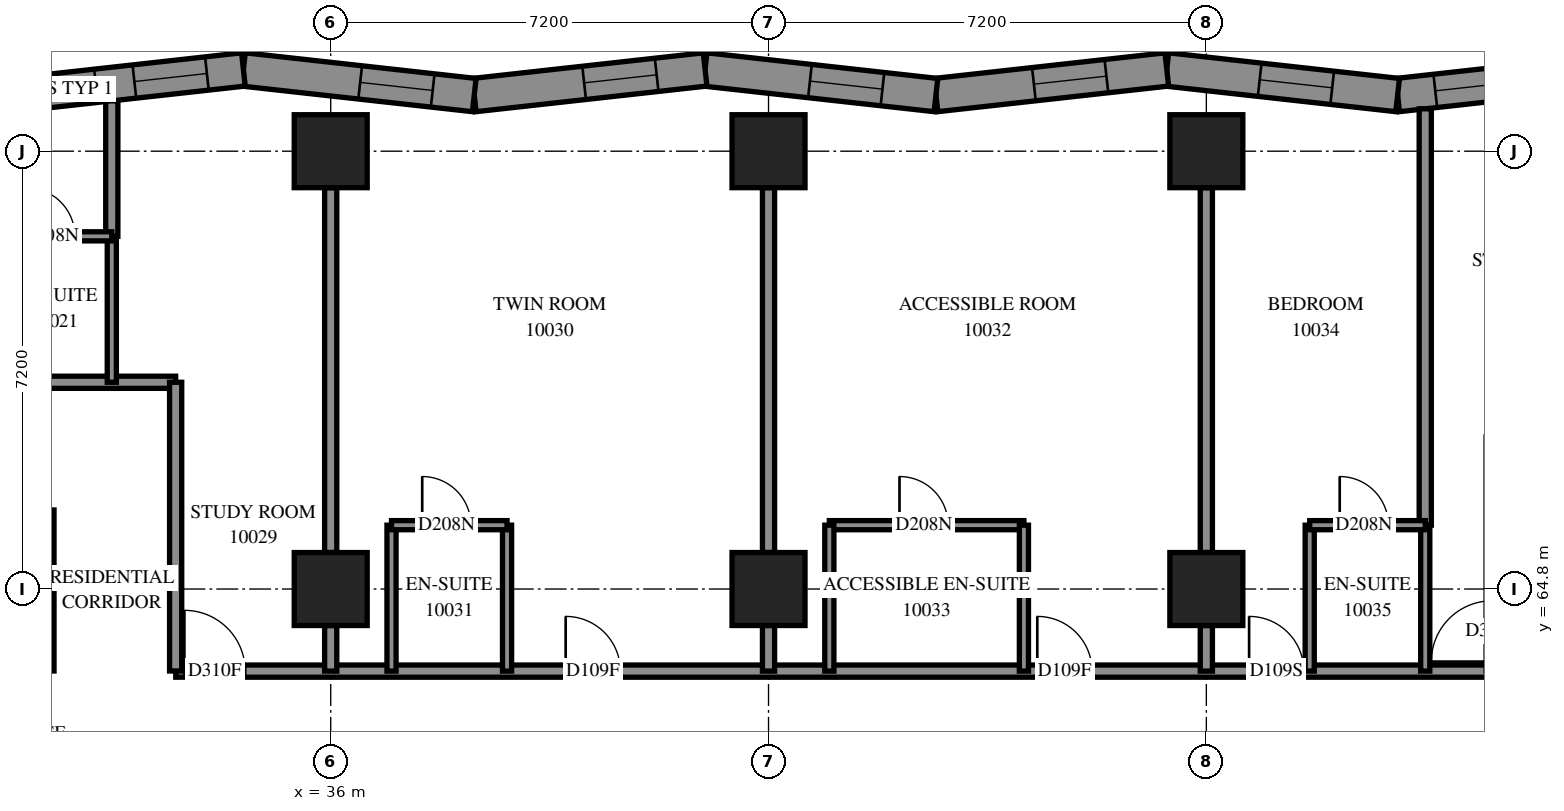
"""IFC4 building model, lengths in metres.
Left out: names, types, materials, properties, quantities, classifications, styles, units other than length and angle.
Written with IfcOpenShell. Run it as: python <this file> out.ifc"""

import sys

from ifc_helpers import new_model, si_unit, direction, frame, frame_2d, origin, origin_2d, place, context, subcontext, project, spatial, polyline, rectangle, outline, extrude, element, fill, save


model = new_model("IFC4")
c1 = context("Model", 3, precision=1e-05, world=origin(), true_north=direction((0.0, 1.0)))
c2 = subcontext(c1, "Body", "Model", "MODEL_VIEW")
j1 = project(units=[si_unit("LENGTHUNIT", "METRE"), si_unit("PLANEANGLEUNIT", "RADIAN")], contexts=[c1])
p1 = place(None, origin())
s1 = spatial("IfcSite", under=j1, at=p1, CompositionType="ELEMENT")
p2 = place(p1, origin())
s2 = spatial("IfcBuilding", under=s1, at=p2, CompositionType="ELEMENT")
p3 = place(p2, frame((0.0, 0.0, 40.6)))
s3 = spatial("IfcBuildingStorey", under=s2, at=p3, CompositionType="ELEMENT", Elevation=40.6)
for number, where, z_axis, x_axis in (
    (1, (36.0, 64.8, 0.0), (0.0, 0.0, 1.0), (1.0, 0.0, 0.0)),
    (2, (36.0, 72.0, 0.0), (0.0, 0.0, 1.0), (1.0, 0.0, 0.0)),
    (3, (43.2, 64.8, 0.0), (0.0, 0.0, 1.0), (1.0, 0.0, 0.0)),
    (4, (43.2, 72.0, 0.0), (0.0, 0.0, 1.0), (1.0, 0.0, 0.0)),
    (5, (50.4, 64.8, 0.0), (0.0, 0.0, 1.0), (1.0, 0.0, 0.0)),
    (6, (50.4, 72.0, 0.0), (0.0, 0.0, 1.0), (1.0, 0.0, 0.0)),
):
    element("IfcColumn", number, at=place(p3, frame(where, z_axis=z_axis, x_axis=x_axis)), inside=s3, PredefinedType="COLUMN", context=c2, shape_type="SweptSolid", body=[
        extrude(rectangle(XDim=1.2, YDim=1.2, at=origin_2d()), origin(), (0.0, 0.0, 1.0), 3.1),
    ])
p4 = place(p3, frame((57.342, 73.344, 0.0), z_axis=(0.0, 0.0, 1.0), x_axis=(-0.99390702, -0.1102217568, 0.0)))
e7 = element("IfcWall", 7, at=p4, inside=s3, PredefinedType="SOLIDWALL", context=c2, shape_type="SweptSolid", body=[
    extrude(outline(polyline([(-0.03, -0.275), (3.789, -0.275), (3.85, 0.275), (0.03, 0.275), (-0.03, -0.275)])), origin(), (0.0, 0.0, 1.0), 3.1),
])
p5 = place(p4, frame((0.397, 0.0, 0.5)))
e8 = element("IfcOpeningElement", 8, at=p5, cuts=e7, PredefinedType="OPENING", context=c2, shape_type="SweptSolid", body=[
    extrude(rectangle(XDim=2.8, YDim=2.45, at=frame_2d((1.4, 1.225))), frame((0.0, 0.285, 0.0), z_axis=(0.0, -1.0, 0.0), x_axis=(1.0, 0.0, 0.0)), (0.0, 0.0, 1.0), 0.57),
])
p6 = place(p3, frame((53.546, 72.923, 0.0), z_axis=(0.0, 0.0, 1.0), x_axis=(-0.99390702, 0.1102217568, 0.0)))
e9 = element("IfcWall", 9, at=p6, inside=s3, PredefinedType="SOLIDWALL", context=c2, shape_type="SweptSolid", body=[
    extrude(outline(polyline([(0.03, -0.275), (3.85, -0.275), (3.789, 0.275), (-0.03, 0.275), (0.03, -0.275)])), origin(), (0.0, 0.0, 1.0), 3.1),
])
p7 = place(p6, frame((1.083, 0.0, 0.5)))
e10 = element("IfcOpeningElement", 10, at=p7, cuts=e9, PredefinedType="OPENING", context=c2, shape_type="SweptSolid", body=[
    extrude(rectangle(XDim=1.2, YDim=2.45, at=frame_2d((0.6, 1.225))), frame((0.0, 0.285, 0.0), z_axis=(0.0, -1.0, 0.0), x_axis=(1.0, 0.0, 0.0)), (0.0, 0.0, 1.0), 0.57),
])
p8 = place(p3, frame((49.749, 73.344, 0.0), z_axis=(0.0, 0.0, 1.0), x_axis=(-0.99390702, -0.1102217568, 0.0)))
e11 = element("IfcWall", 11, at=p8, inside=s3, PredefinedType="SOLIDWALL", context=c2, shape_type="SweptSolid", body=[
    extrude(outline(polyline([(-0.03, -0.275), (3.789, -0.275), (3.85, 0.275), (0.03, 0.275), (-0.03, -0.275)])), origin(), (0.0, 0.0, 1.0), 3.1),
])
p9 = place(p8, frame((0.999, 0.0, 0.5)))
e12 = element("IfcOpeningElement", 12, at=p9, cuts=e11, PredefinedType="OPENING", context=c2, shape_type="SweptSolid", body=[
    extrude(rectangle(XDim=1.2, YDim=2.45, at=frame_2d((0.6, 1.225))), frame((0.0, 0.285, 0.0), z_axis=(0.0, -1.0, 0.0), x_axis=(1.0, 0.0, 0.0)), (0.0, 0.0, 1.0), 0.57),
])
p10 = place(p3, frame((45.953, 72.923, 0.0), z_axis=(0.0, 0.0, 1.0), x_axis=(-0.99390702, 0.1102217568, 0.0)))
e13 = element("IfcWall", 13, at=p10, inside=s3, PredefinedType="SOLIDWALL", context=c2, shape_type="SweptSolid", body=[
    extrude(outline(polyline([(0.03, -0.275), (3.85, -0.275), (3.789, 0.275), (-0.03, 0.275), (0.03, -0.275)])), origin(), (0.0, 0.0, 1.0), 3.1),
])
p11 = place(p10, frame((0.885, 0.0, 0.5)))
e14 = element("IfcOpeningElement", 14, at=p11, cuts=e13, PredefinedType="OPENING", context=c2, shape_type="SweptSolid", body=[
    extrude(rectangle(XDim=1.2, YDim=2.45, at=frame_2d((0.6, 1.225))), frame((0.0, 0.285, 0.0), z_axis=(0.0, -1.0, 0.0), x_axis=(1.0, 0.0, 0.0)), (0.0, 0.0, 1.0), 0.57),
])
p12 = place(p3, frame((42.157, 73.344, 0.0), z_axis=(0.0, 0.0, 1.0), x_axis=(-0.99390702, -0.1102217568, 0.0)))
e15 = element("IfcWall", 15, at=p12, inside=s3, PredefinedType="SOLIDWALL", context=c2, shape_type="SweptSolid", body=[
    extrude(outline(polyline([(-0.03, -0.275), (3.789, -0.275), (3.85, 0.275), (0.03, 0.275), (-0.03, -0.275)])), origin(), (0.0, 0.0, 1.0), 3.1),
])
p13 = place(p12, frame((0.801, 0.0, 0.5)))
e16 = element("IfcOpeningElement", 16, at=p13, cuts=e15, PredefinedType="OPENING", context=c2, shape_type="SweptSolid", body=[
    extrude(rectangle(XDim=1.2, YDim=2.45, at=frame_2d((0.6, 1.225))), frame((0.0, 0.285, 0.0), z_axis=(0.0, -1.0, 0.0), x_axis=(1.0, 0.0, 0.0)), (0.0, 0.0, 1.0), 0.57),
])
p14 = place(p3, frame((38.361, 72.923, 0.0), z_axis=(0.0, 0.0, 1.0), x_axis=(-0.99390702, 0.1102217568, 0.0)))
e17 = element("IfcWall", 17, at=p14, inside=s3, PredefinedType="SOLIDWALL", context=c2, shape_type="SweptSolid", body=[
    extrude(outline(polyline([(0.03, -0.275), (3.85, -0.275), (3.789, 0.275), (-0.03, 0.275), (0.03, -0.275)])), origin(), (0.0, 0.0, 1.0), 3.1),
])
p15 = place(p14, frame((0.688, 0.0, 0.5)))
e18 = element("IfcOpeningElement", 18, at=p15, cuts=e17, PredefinedType="OPENING", context=c2, shape_type="SweptSolid", body=[
    extrude(rectangle(XDim=1.2, YDim=2.45, at=frame_2d((0.6, 1.225))), frame((0.0, 0.285, 0.0), z_axis=(0.0, -1.0, 0.0), x_axis=(1.0, 0.0, 0.0)), (0.0, 0.0, 1.0), 0.57),
])
p16 = place(p3, frame((34.564, 73.344, 0.0), z_axis=(0.0, 0.0, 1.0), x_axis=(-0.993907338, -0.1102188888, 0.0)))
e19 = element("IfcWall", 19, at=p16, inside=s3, PredefinedType="SOLIDWALL", context=c2, shape_type="SweptSolid", body=[
    extrude(outline(polyline([(-0.03, -0.275), (3.789, -0.275), (3.85, 0.275), (0.03, 0.275), (-0.03, -0.275)])), origin(), (0.0, 0.0, 1.0), 3.1),
])
p17 = place(p16, frame((0.604, 0.0, 0.5)))
e20 = element("IfcOpeningElement", 20, at=p17, cuts=e19, PredefinedType="OPENING", context=c2, shape_type="SweptSolid", body=[
    extrude(rectangle(XDim=1.2, YDim=2.45, at=frame_2d((0.6, 1.225))), frame((0.0, 0.285, 0.0), z_axis=(0.0, -1.0, 0.0), x_axis=(1.0, 0.0, 0.0)), (0.0, 0.0, 1.0), 0.57),
])
p18 = place(p16, frame((2.439, 0.0, 0.45)))
e21 = element("IfcOpeningElement", 21, at=p18, cuts=e19, PredefinedType="OPENING", context=c2, shape_type="SweptSolid", body=[
    extrude(rectangle(XDim=1.0, YDim=2.5, at=frame_2d((0.5, 1.25))), frame((0.0, 0.285, 0.0), z_axis=(0.0, -1.0, 0.0), x_axis=(1.0, 0.0, 0.0)), (0.0, 0.0, 1.0), 0.57),
])
p19 = place(p3, frame((33.452, 63.45, 0.0), z_axis=(0.0, 0.0, 1.0), x_axis=(1.0, 0.0, 0.0)))
e22 = element("IfcWall", 22, at=p19, inside=s3, PredefinedType="PARTITIONING", context=c2, shape_type="SweptSolid", body=[
    extrude(rectangle(XDim=21.648, YDim=0.2, at=frame_2d((10.824, 0.0))), origin(), (0.0, 0.0, 1.0), 3.1),
])
p20 = place(p19, frame((0.142, 0.0, 0.0)))
e23 = element("IfcOpeningElement", 23, at=p20, cuts=e22, PredefinedType="OPENING", context=c2, shape_type="SweptSolid", body=[
    extrude(rectangle(XDim=1.0, YDim=2.1, at=frame_2d((0.5, 1.05))), frame((0.0, 0.11, 0.0), z_axis=(0.0, -1.0, 0.0), x_axis=(1.0, 0.0, 0.0)), (0.0, 0.0, 1.0), 0.22),
])
p21 = place(p19, frame((6.412, 0.0, 0.0)))
e24 = element("IfcOpeningElement", 24, at=p21, cuts=e22, PredefinedType="OPENING", context=c2, shape_type="SweptSolid", body=[
    extrude(rectangle(XDim=0.9, YDim=2.1, at=frame_2d((0.45, 1.05))), frame((0.0, 0.11, 0.0), z_axis=(0.0, -1.0, 0.0), x_axis=(1.0, 0.0, 0.0)), (0.0, 0.0, 1.0), 0.22),
])
p22 = place(p19, frame((14.168, 0.0, 0.0)))
e25 = element("IfcOpeningElement", 25, at=p22, cuts=e22, PredefinedType="OPENING", context=c2, shape_type="SweptSolid", body=[
    extrude(rectangle(XDim=0.9, YDim=2.1, at=frame_2d((0.45, 1.05))), frame((0.0, 0.11, 0.0), z_axis=(0.0, -1.0, 0.0), x_axis=(1.0, 0.0, 0.0)), (0.0, 0.0, 1.0), 0.22),
])
p23 = place(p19, frame((17.651, 0.0, 0.0)))
e26 = element("IfcOpeningElement", 26, at=p23, cuts=e22, PredefinedType="OPENING", context=c2, shape_type="SweptSolid", body=[
    extrude(rectangle(XDim=0.9, YDim=2.1, at=frame_2d((0.45, 1.05))), frame((0.0, 0.11, 0.0), z_axis=(0.0, -1.0, 0.0), x_axis=(1.0, 0.0, 0.0)), (0.0, 0.0, 1.0), 0.22),
])
p24 = place(p3, frame((21.602, 68.2, 0.0), z_axis=(0.0, 0.0, 1.0), x_axis=(1.0, 0.0, 0.0)))
e27 = element("IfcWall", 27, at=p24, inside=s3, PredefinedType="PARTITIONING", context=c2, shape_type="SweptSolid", body=[
    extrude(rectangle(XDim=11.848, YDim=0.2, at=frame_2d((5.924, 0.0))), origin(), (0.0, 0.0, 1.0), 3.1),
])
p25 = place(p24, frame((5.855, 0.0, 0.0)))
e28 = element("IfcOpeningElement", 28, at=p25, cuts=e27, PredefinedType="OPENING", context=c2, shape_type="SweptSolid", body=[
    extrude(rectangle(XDim=0.9, YDim=2.1, at=frame_2d((0.45, 1.05))), frame((0.0, 0.11, 0.0), z_axis=(0.0, -1.0, 0.0), x_axis=(1.0, 0.0, 0.0)), (0.0, 0.0, 1.0), 0.22),
])
p26 = place(p3, frame((54.0, 65.85, 0.0), z_axis=(0.0, 0.0, 1.0), x_axis=(0.0, 1.0, 0.0)))
e29 = element("IfcWall", 29, at=p26, inside=s3, PredefinedType="PARTITIONING", context=c2, shape_type="SweptSolid", body=[
    extrude(rectangle(XDim=6.847, YDim=0.2, at=frame_2d((3.424, 0.0))), origin(), (0.0, 0.0, 1.0), 3.1),
])
for number, where, z_axis, x_axis in (
    (30, (36.0, 65.4, 0.0), (0.0, 0.0, 1.0), (0.0, 1.0, 0.0)),
    (31, (43.2, 65.4, 0.0), (0.0, 0.0, 1.0), (0.0, 1.0, 0.0)),
    (32, (50.4, 65.4, 0.0), (0.0, 0.0, 1.0), (0.0, 1.0, 0.0)),
):
    element("IfcWall", number, at=place(p3, frame(where, z_axis=z_axis, x_axis=x_axis)), inside=s3, PredefinedType="PARTITIONING", context=c2, shape_type="SweptSolid", body=[
        extrude(rectangle(XDim=6.0, YDim=0.2, at=frame_2d((3.0, 0.0))), origin(), (0.0, 0.0, 1.0), 3.1),
    ])
p27 = place(p3, frame((33.45, 63.452, 0.0), z_axis=(0.0, 0.0, 1.0), x_axis=(0.0, 1.0, 0.0)))
e33 = element("IfcWall", 33, at=p27, inside=s3, PredefinedType="PARTITIONING", context=c2, shape_type="SweptSolid", body=[
    extrude(rectangle(XDim=4.748, YDim=0.2, at=frame_2d((2.374, 0.0))), origin(), (0.0, 0.0, 1.0), 3.1),
])
p28 = place(p3, frame((44.2, 65.85, 0.0), z_axis=(0.0, 0.0, 1.0), x_axis=(1.0, 0.0, 0.0)))
e34 = element("IfcWall", 34, at=p28, inside=s3, PredefinedType="PARTITIONING", context=c2, shape_type="SweptSolid", body=[
    extrude(rectangle(XDim=3.2, YDim=0.15, at=frame_2d((1.6, 0.0))), origin(), (0.0, 0.0, 1.0), 3.1),
])
p29 = place(p28, frame((1.154, 0.0, 0.0)))
e35 = element("IfcOpeningElement", 35, at=p29, cuts=e34, PredefinedType="OPENING", context=c2, shape_type="SweptSolid", body=[
    extrude(rectangle(XDim=0.8, YDim=2.1, at=frame_2d((0.4, 1.05))), frame((0.0, 0.085, 0.0), z_axis=(0.0, -1.0, 0.0), x_axis=(1.0, 0.0, 0.0)), (0.0, 0.0, 1.0), 0.17),
])
p30 = place(p3, frame((31.35, 63.452, 0.0), z_axis=(0.0, 0.0, 1.0), x_axis=(0.0, 1.0, 0.0)))
e36 = element("IfcWall", 36, at=p30, inside=s3, PredefinedType="PARTITIONING", context=c2, shape_type="SweptSolid", body=[
    extrude(rectangle(XDim=2.648, YDim=0.2, at=frame_2d((1.324, 0.0))), origin(), (0.0, 0.0, 1.0), 3.1),
])
for number, where, z_axis, x_axis in (
    (37, (32.4, 68.2, 0.0), (0.0, 0.0, 1.0), (0.0, 1.0, 0.0)),
    (38, (37.0, 63.45, 0.0), (0.0, 0.0, 1.0), (0.0, 1.0, 0.0)),
    (39, (38.9, 63.45, 0.0), (0.0, 0.0, 1.0), (0.0, 1.0, 0.0)),
    (40, (44.2, 63.45, 0.0), (0.0, 0.0, 1.0), (0.0, 1.0, 0.0)),
    (41, (47.4, 63.45, 0.0), (0.0, 0.0, 1.0), (0.0, 1.0, 0.0)),
    (42, (52.1, 63.45, 0.0), (0.0, 0.0, 1.0), (0.0, 1.0, 0.0)),
    (43, (54.0, 63.45, 0.0), (0.0, 0.0, 1.0), (0.0, 1.0, 0.0)),
):
    element("IfcWall", number, at=place(p3, frame(where, z_axis=z_axis, x_axis=x_axis)), inside=s3, PredefinedType="PARTITIONING", context=c2, shape_type="SweptSolid", body=[
        extrude(rectangle(XDim=2.4, YDim=0.15, at=frame_2d((1.2, 0.0))), origin(), (0.0, 0.0, 1.0), 3.1),
    ])
p31 = place(p3, frame((32.4, 70.6, 0.0), z_axis=(0.0, 0.0, 1.0), x_axis=(0.0, 1.0, 0.0)))
e44 = element("IfcWall", 44, at=p31, inside=s3, PredefinedType="PARTITIONING", context=c2, shape_type="SweptSolid", body=[
    extrude(rectangle(XDim=2.228, YDim=0.2, at=frame_2d((1.114, 0.0))), origin(), (0.0, 0.0, 1.0), 3.1),
])
p32 = place(p3, frame((30.5, 70.6, 0.0), z_axis=(0.0, 0.0, 1.0), x_axis=(1.0, 0.0, 0.0)))
e45 = element("IfcWall", 45, at=p32, inside=s3, PredefinedType="PARTITIONING", context=c2, shape_type="SweptSolid", body=[
    extrude(rectangle(XDim=1.9, YDim=0.15, at=frame_2d((0.95, 0.0))), origin(), (0.0, 0.0, 1.0), 3.1),
])
p33 = place(p32, frame((0.493, 0.0, 0.0)))
e46 = element("IfcOpeningElement", 46, at=p33, cuts=e45, PredefinedType="OPENING", context=c2, shape_type="SweptSolid", body=[
    extrude(rectangle(XDim=0.8, YDim=2.1, at=frame_2d((0.4, 1.05))), frame((0.0, 0.085, 0.0), z_axis=(0.0, -1.0, 0.0), x_axis=(1.0, 0.0, 0.0)), (0.0, 0.0, 1.0), 0.17),
])
p34 = place(p3, frame((37.0, 65.85, 0.0), z_axis=(0.0, 0.0, 1.0), x_axis=(1.0, 0.0, 0.0)))
e47 = element("IfcWall", 47, at=p34, inside=s3, PredefinedType="PARTITIONING", context=c2, shape_type="SweptSolid", body=[
    extrude(rectangle(XDim=1.9, YDim=0.15, at=frame_2d((0.95, 0.0))), origin(), (0.0, 0.0, 1.0), 3.1),
])
p35 = place(p34, frame((0.505, 0.0, 0.0)))
e48 = element("IfcOpeningElement", 48, at=p35, cuts=e47, PredefinedType="OPENING", context=c2, shape_type="SweptSolid", body=[
    extrude(rectangle(XDim=0.8, YDim=2.1, at=frame_2d((0.4, 1.05))), frame((0.0, 0.085, 0.0), z_axis=(0.0, -1.0, 0.0), x_axis=(1.0, 0.0, 0.0)), (0.0, 0.0, 1.0), 0.17),
])
p36 = place(p3, frame((52.1, 65.85, 0.0), z_axis=(0.0, 0.0, 1.0), x_axis=(1.0, 0.0, 0.0)))
e49 = element("IfcWall", 49, at=p36, inside=s3, PredefinedType="PARTITIONING", context=c2, shape_type="SweptSolid", body=[
    extrude(rectangle(XDim=1.9, YDim=0.15, at=frame_2d((0.95, 0.0))), origin(), (0.0, 0.0, 1.0), 3.1),
])
p37 = place(p36, frame((0.493, 0.0, 0.0)))
e50 = element("IfcOpeningElement", 50, at=p37, cuts=e49, PredefinedType="OPENING", context=c2, shape_type="SweptSolid", body=[
    extrude(rectangle(XDim=0.8, YDim=2.1, at=frame_2d((0.4, 1.05))), frame((0.0, 0.085, 0.0), z_axis=(0.0, -1.0, 0.0), x_axis=(1.0, 0.0, 0.0)), (0.0, 0.0, 1.0), 0.17),
])
for number, where, z_axis, x_axis in (
    (51, (36.0, 63.45, 0.0), (0.0, 0.0, 1.0), (0.0, 1.0, 0.0)),
    (52, (43.2, 63.45, 0.0), (0.0, 0.0, 1.0), (0.0, 1.0, 0.0)),
    (53, (50.4, 63.45, 0.0), (0.0, 0.0, 1.0), (0.0, 1.0, 0.0)),
):
    element("IfcWall", number, at=place(p3, frame(where, z_axis=z_axis, x_axis=x_axis)), inside=s3, PredefinedType="PARTITIONING", context=c2, shape_type="SweptSolid", body=[
        extrude(rectangle(XDim=0.75, YDim=0.2, at=frame_2d((0.375, 0.0))), origin(), (0.0, 0.0, 1.0), 3.1),
    ])
p38 = place(p5, origin())
e54 = element("IfcWindow", 54, at=p38, inside=s3, PartitioningType="SINGLE_PANEL", PredefinedType="WINDOW", context=c2, shape_type="SweptSolid", body=[
    extrude(rectangle(XDim=2.8, YDim=2.45, at=frame_2d((1.4, 1.225))), frame((0.0, 0.155, 0.0), z_axis=(0.0, -1.0, 0.0), x_axis=(1.0, 0.0, 0.0)), (0.0, 0.0, 1.0), 0.06),
])
fill(e8, e54)
p39 = place(p7, origin())
e55 = element("IfcWindow", 55, at=p39, inside=s3, PartitioningType="SINGLE_PANEL", PredefinedType="WINDOW", context=c2, shape_type="SweptSolid", body=[
    extrude(rectangle(XDim=1.2, YDim=2.45, at=frame_2d((0.6, 1.225))), frame((0.0, 0.155, 0.0), z_axis=(0.0, -1.0, 0.0), x_axis=(1.0, 0.0, 0.0)), (0.0, 0.0, 1.0), 0.06),
])
fill(e10, e55)
p40 = place(p9, origin())
e56 = element("IfcWindow", 56, at=p40, inside=s3, PartitioningType="SINGLE_PANEL", PredefinedType="WINDOW", context=c2, shape_type="SweptSolid", body=[
    extrude(rectangle(XDim=1.2, YDim=2.45, at=frame_2d((0.6, 1.225))), frame((0.0, 0.155, 0.0), z_axis=(0.0, -1.0, 0.0), x_axis=(1.0, 0.0, 0.0)), (0.0, 0.0, 1.0), 0.06),
])
fill(e12, e56)
p41 = place(p11, origin())
e57 = element("IfcWindow", 57, at=p41, inside=s3, PartitioningType="SINGLE_PANEL", PredefinedType="WINDOW", context=c2, shape_type="SweptSolid", body=[
    extrude(rectangle(XDim=1.2, YDim=2.45, at=frame_2d((0.6, 1.225))), frame((0.0, 0.155, 0.0), z_axis=(0.0, -1.0, 0.0), x_axis=(1.0, 0.0, 0.0)), (0.0, 0.0, 1.0), 0.06),
])
fill(e14, e57)
p42 = place(p13, origin())
e58 = element("IfcWindow", 58, at=p42, inside=s3, PartitioningType="SINGLE_PANEL", PredefinedType="WINDOW", context=c2, shape_type="SweptSolid", body=[
    extrude(rectangle(XDim=1.2, YDim=2.45, at=frame_2d((0.6, 1.225))), frame((0.0, 0.155, 0.0), z_axis=(0.0, -1.0, 0.0), x_axis=(1.0, 0.0, 0.0)), (0.0, 0.0, 1.0), 0.06),
])
fill(e16, e58)
p43 = place(p15, origin())
e59 = element("IfcWindow", 59, at=p43, inside=s3, PartitioningType="SINGLE_PANEL", PredefinedType="WINDOW", context=c2, shape_type="SweptSolid", body=[
    extrude(rectangle(XDim=1.2, YDim=2.45, at=frame_2d((0.6, 1.225))), frame((0.0, 0.155, 0.0), z_axis=(0.0, -1.0, 0.0), x_axis=(1.0, 0.0, 0.0)), (0.0, 0.0, 1.0), 0.06),
])
fill(e18, e59)
p44 = place(p17, origin())
e60 = element("IfcWindow", 60, at=p44, inside=s3, PartitioningType="SINGLE_PANEL", PredefinedType="WINDOW", context=c2, shape_type="SweptSolid", body=[
    extrude(rectangle(XDim=1.2, YDim=2.45, at=frame_2d((0.6, 1.225))), frame((0.0, 0.155, 0.0), z_axis=(0.0, -1.0, 0.0), x_axis=(1.0, 0.0, 0.0)), (0.0, 0.0, 1.0), 0.06),
])
fill(e20, e60)
p45 = place(p33, origin())
e61 = element("IfcDoor", 61, at=p45, inside=s3, OperationType="SINGLE_SWING_RIGHT", PredefinedType="DOOR", context=c2, shape_type="SweptSolid", body=[
    extrude(rectangle(XDim=0.8, YDim=2.1, at=frame_2d((0.4, 1.05))), frame((0.0, 0.025, 0.0), z_axis=(0.0, -1.0, 0.0), x_axis=(1.0, 0.0, 0.0)), (0.0, 0.0, 1.0), 0.05),
])
fill(e46, e61)
p46 = place(p20, origin())
e62 = element("IfcDoor", 62, at=p46, inside=s3, OperationType="SINGLE_SWING_LEFT", PredefinedType="DOOR", context=c2, shape_type="SweptSolid", body=[
    extrude(rectangle(XDim=1.0, YDim=2.1, at=frame_2d((0.5, 1.05))), frame((0.0, 0.025, 0.0), z_axis=(0.0, -1.0, 0.0), x_axis=(1.0, 0.0, 0.0)), (0.0, 0.0, 1.0), 0.05),
])
fill(e23, e62)
p47 = place(p21, origin())
e63 = element("IfcDoor", 63, at=p47, inside=s3, OperationType="SINGLE_SWING_RIGHT", PredefinedType="DOOR", context=c2, shape_type="SweptSolid", body=[
    extrude(rectangle(XDim=0.9, YDim=2.1, at=frame_2d((0.45, 1.05))), frame((0.0, 0.025, 0.0), z_axis=(0.0, -1.0, 0.0), x_axis=(1.0, 0.0, 0.0)), (0.0, 0.0, 1.0), 0.05),
])
fill(e24, e63)
p48 = place(p35, origin())
e64 = element("IfcDoor", 64, at=p48, inside=s3, OperationType="SINGLE_SWING_RIGHT", PredefinedType="DOOR", context=c2, shape_type="SweptSolid", body=[
    extrude(rectangle(XDim=0.8, YDim=2.1, at=frame_2d((0.4, 1.05))), frame((0.0, 0.025, 0.0), z_axis=(0.0, -1.0, 0.0), x_axis=(1.0, 0.0, 0.0)), (0.0, 0.0, 1.0), 0.05),
])
fill(e48, e64)
p49 = place(p22, origin())
e65 = element("IfcDoor", 65, at=p49, inside=s3, OperationType="SINGLE_SWING_RIGHT", PredefinedType="DOOR", context=c2, shape_type="SweptSolid", body=[
    extrude(rectangle(XDim=0.9, YDim=2.1, at=frame_2d((0.45, 1.05))), frame((0.0, 0.025, 0.0), z_axis=(0.0, -1.0, 0.0), x_axis=(1.0, 0.0, 0.0)), (0.0, 0.0, 1.0), 0.05),
])
fill(e25, e65)
p50 = place(p29, origin())
e66 = element("IfcDoor", 66, at=p50, inside=s3, OperationType="SINGLE_SWING_RIGHT", PredefinedType="DOOR", context=c2, shape_type="SweptSolid", body=[
    extrude(rectangle(XDim=0.8, YDim=2.1, at=frame_2d((0.4, 1.05))), frame((0.0, 0.025, 0.0), z_axis=(0.0, -1.0, 0.0), x_axis=(1.0, 0.0, 0.0)), (0.0, 0.0, 1.0), 0.05),
])
fill(e35, e66)
p51 = place(p23, origin())
e67 = element("IfcDoor", 67, at=p51, inside=s3, OperationType="SINGLE_SWING_RIGHT", PredefinedType="DOOR", context=c2, shape_type="SweptSolid", body=[
    extrude(rectangle(XDim=0.9, YDim=2.1, at=frame_2d((0.45, 1.05))), frame((0.0, 0.025, 0.0), z_axis=(0.0, -1.0, 0.0), x_axis=(1.0, 0.0, 0.0)), (0.0, 0.0, 1.0), 0.05),
])
fill(e26, e67)
p52 = place(p37, origin())
e68 = element("IfcDoor", 68, at=p52, inside=s3, OperationType="SINGLE_SWING_RIGHT", PredefinedType="DOOR", context=c2, shape_type="SweptSolid", body=[
    extrude(rectangle(XDim=0.8, YDim=2.1, at=frame_2d((0.4, 1.05))), frame((0.0, 0.025, 0.0), z_axis=(0.0, -1.0, 0.0), x_axis=(1.0, 0.0, 0.0)), (0.0, 0.0, 1.0), 0.05),
])
fill(e50, e68)
p53 = place(p18, origin())
e69 = element("IfcWindow", 69, at=p53, inside=s3, PartitioningType="SINGLE_PANEL", PredefinedType="WINDOW", context=c2, shape_type="SweptSolid", body=[
    extrude(rectangle(XDim=1.0, YDim=2.5, at=frame_2d((0.5, 1.25))), frame((0.0, 0.155, 0.0), z_axis=(0.0, -1.0, 0.0), x_axis=(1.0, 0.0, 0.0)), (0.0, 0.0, 1.0), 0.06),
])
fill(e21, e69)
save(model, sys.argv[1])
